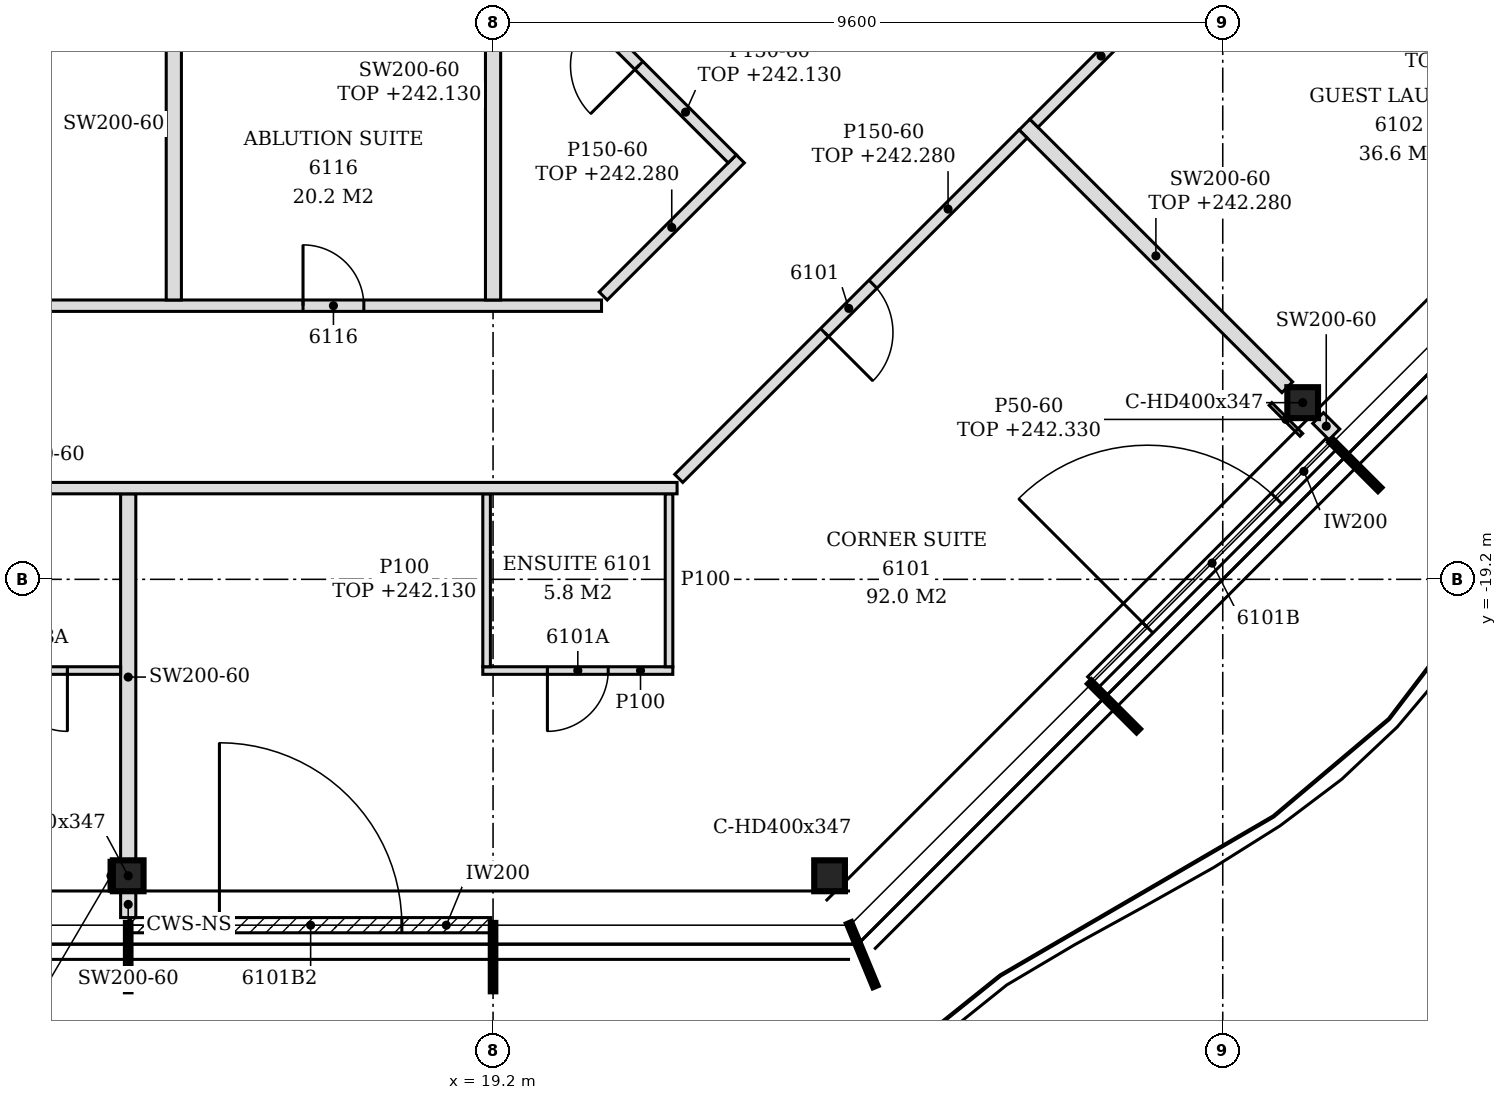
"""IFC4 building model, lengths in metres.
Left out: names, types, materials, properties, quantities, classifications, styles, units other than length and angle.
Written with IfcOpenShell. Run it as: python <this file> out.ifc"""

import sys

from ifc_helpers import new_model, si_unit, direction, frame, frame_2d, origin, origin_2d, place, context, subcontext, project, spatial, polyline, rectangle, i_section, outline, extrude, element, fill, save


model = new_model("IFC4")
c1 = context("Model", 3, precision=1e-05, world=origin(), true_north=direction((0.0, 1.0)))
c2 = subcontext(c1, "Body", "Model", "MODEL_VIEW")
j1 = project(units=[si_unit("LENGTHUNIT", "METRE"), si_unit("PLANEANGLEUNIT", "RADIAN")], contexts=[c1])
p1 = place(None, origin())
s1 = spatial("IfcSite", under=j1, at=p1, CompositionType="ELEMENT")
p2 = place(p1, origin())
s2 = spatial("IfcBuilding", under=s1, at=p2, CompositionType="ELEMENT")
p3 = place(p2, frame((0.0, 0.0, 239.4)))
s3 = spatial("IfcBuildingStorey", under=s2, at=p3, CompositionType="ELEMENT", Elevation=239.4)
for number, where, z_axis, x_axis in (
    (1, (14.4, -23.1, -0.15), (0.0, 0.0, 1.0), (1.0, 0.0, 0.0)),
    (2, (23.627, -23.1, -0.15), (0.0, 0.0, 1.0), (1.0, 0.0, 0.0)),
    (3, (29.852, -16.876, -0.15), (0.0, 0.0, 1.0), (1.0, 0.0, 0.0)),
):
    element("IfcColumn", number, at=place(p3, frame(where, z_axis=z_axis, x_axis=x_axis)), inside=s3, PredefinedType="COLUMN", context=c2, shape_type="SweptSolid", body=[
        extrude(i_section(OverallWidth=0.404, OverallDepth=0.407, WebThickness=0.027, FlangeThickness=0.044, FilletRadius=0.015, at=origin_2d()), origin(), (0.0, 0.0, 1.0), 3.6),
    ])
p4 = place(p3, frame((14.43, -23.75, 0.0), z_axis=(0.0, 0.0, 1.0), x_axis=(1.0, 0.0, 0.0)))
e4 = element("IfcWall", 4, at=p4, inside=s3, PredefinedType="NOTDEFINED", context=c2, shape_type="SweptSolid", body=[
    extrude(rectangle(XDim=4.74, YDim=0.2, at=frame_2d((2.37, 0.0))), origin(), (0.0, 0.0, 1.0), 3.45),
])
p5 = place(p4, frame((1.17, 0.0, 0.0)))
e5 = element("IfcOpeningElement", 5, at=p5, cuts=e4, PredefinedType="OPENING", context=c2, shape_type="SweptSolid", body=[
    extrude(rectangle(XDim=2.4, YDim=2.4, at=frame_2d((1.2, 1.2))), frame((0.0, 0.11, 0.0), z_axis=(0.0, -1.0, 0.0), x_axis=(1.0, 0.0, 0.0)), (0.0, 0.0, 1.0), 0.22),
])
p6 = place(p3, frame((27.093, -20.553, 0.0), z_axis=(0.0, 0.0, 1.0), x_axis=(0.707079231393, 0.707134329907, 0.0)))
e6 = element("IfcWall", 6, at=p6, inside=s3, PredefinedType="NOTDEFINED", context=c2, shape_type="SweptSolid", body=[
    extrude(rectangle(XDim=4.431, YDim=0.2, at=frame_2d((2.215, 0.0))), origin(), (0.0, 0.0, 1.0), 3.45),
])
p7 = place(p6, frame((1.015, 0.0, 0.0)))
e7 = element("IfcOpeningElement", 7, at=p7, cuts=e6, PredefinedType="OPENING", context=c2, shape_type="SweptSolid", body=[
    extrude(rectangle(XDim=2.4, YDim=2.4, at=frame_2d((1.2, 1.2))), frame((0.0, 0.11, 0.0), z_axis=(0.0, -1.0, 0.0), x_axis=(1.0, 0.0, 0.0)), (0.0, 0.0, 1.0), 0.22),
])
p8 = place(p3, frame((14.4, -23.65, 0.0), z_axis=(0.0, 0.0, 1.0), x_axis=(0.0, 1.0, 0.0)))
e8 = element("IfcWall", 8, at=p8, inside=s3, PredefinedType="PARTITIONING", context=c2, shape_type="SweptSolid", body=[
    extrude(rectangle(XDim=0.346, YDim=0.2, at=frame_2d((0.173, 0.0))), origin(), (0.0, 0.0, 1.0), 3.45),
])
p9 = place(p3, frame((14.4, -22.896, 0.0), z_axis=(0.0, 0.0, 1.0), x_axis=(0.0, 1.0, 0.0)))
e9 = element("IfcWall", 9, at=p9, inside=s3, PredefinedType="PARTITIONING", context=c2, shape_type="SweptSolid", body=[
    extrude(outline(polyline([(0.0, 0.0), (4.822, 0.0), (4.822, 3.45), (3.802, 3.45), (3.8, 2.88), (3.592, 2.88), (3.59, 3.45), (0.0, 3.45), (0.0, 0.0)])), frame((0.0, 0.1, 0.0), z_axis=(0.0, -1.0, 0.0), x_axis=(1.0, 0.0, 0.0)), (0.0, 0.0, 1.0), 0.2),
])
p10 = place(p3, frame((11.95, -20.4, 0.0), z_axis=(0.0, 0.0, 1.0), x_axis=(1.0, 0.0, 0.0)))
e10 = element("IfcWall", 10, at=p10, inside=s3, PredefinedType="PARTITIONING", context=c2, shape_type="SweptSolid", body=[
    extrude(rectangle(XDim=2.35, YDim=0.1, at=frame_2d((1.175, 0.0))), origin(), (0.0, 0.0, 1.0), 3.45),
])
p11 = place(p10, frame((0.85, 0.0, 0.0)))
e11 = element("IfcOpeningElement", 11, at=p11, cuts=e10, PredefinedType="OPENING", context=c2, shape_type="SweptSolid", body=[
    extrude(rectangle(XDim=0.8, YDim=2.1, at=frame_2d((0.4, 1.05))), frame((0.0, 0.06, 0.0), z_axis=(0.0, -1.0, 0.0), x_axis=(1.0, 0.0, 0.0)), (0.0, 0.0, 1.0), 0.12),
])
p12 = place(p3, frame((19.065, -20.4, 0.0), z_axis=(0.0, 0.0, 1.0), x_axis=(1.0, 0.0, 0.0)))
e12 = element("IfcWall", 12, at=p12, inside=s3, PredefinedType="PARTITIONING", context=c2, shape_type="SweptSolid", body=[
    extrude(outline(polyline([(0.0, 0.0), (2.5, 0.0), (2.5, 3.45), (0.285, 3.45), (0.283, 2.73), (0.0, 2.73), (0.0, 0.0)])), frame((0.0, 0.05, 0.0), z_axis=(0.0, -1.0, 0.0), x_axis=(1.0, 0.0, 0.0)), (0.0, 0.0, 1.0), 0.1),
])
p13 = place(p12, frame((0.85, 0.0, 0.0)))
e13 = element("IfcOpeningElement", 13, at=p13, cuts=e12, PredefinedType="OPENING", context=c2, shape_type="SweptSolid", body=[
    extrude(rectangle(XDim=0.8, YDim=2.1, at=frame_2d((0.4, 1.05))), frame((0.0, 0.06, 0.0), z_axis=(0.0, -1.0, 0.0), x_axis=(1.0, 0.0, 0.0)), (0.0, 0.0, 1.0), 0.12),
])
p14 = place(p3, frame((19.115, -20.35, 0.0), z_axis=(0.0, 0.0, 1.0), x_axis=(0.0, 1.0, 0.0)))
e14 = element("IfcWall", 14, at=p14, inside=s3, PredefinedType="PARTITIONING", context=c2, shape_type="SweptSolid", body=[
    extrude(rectangle(XDim=2.275, YDim=0.1, at=frame_2d((1.138, 0.0))), origin(), (0.0, 0.0, 1.0), 2.73),
])
p15 = place(p3, frame((21.515, -20.35, 0.0), z_axis=(0.0, 0.0, 1.0), x_axis=(0.0, 1.0, 0.0)))
e15 = element("IfcWall", 15, at=p15, inside=s3, PredefinedType="PARTITIONING", context=c2, shape_type="SweptSolid", body=[
    extrude(outline(polyline([(0.0, 0.0), (2.275, 0.0), (2.275, 3.45), (1.245, 3.45), (1.243, 2.98), (1.055, 2.98), (1.053, 3.45), (0.0, 3.45), (0.0, 0.0)])), frame((0.0, 0.05, 0.0), z_axis=(0.0, -1.0, 0.0), x_axis=(1.0, 0.0, 0.0)), (0.0, 0.0, 1.0), 0.1),
])
p16 = place(p3, frame((-0.726, -18.0, 0.0), z_axis=(0.0, 0.0, 1.0), x_axis=(1.0, 0.0, 0.0)))
e16 = element("IfcWall", 16, at=p16, inside=s3, PredefinedType="PARTITIONING", context=c2, shape_type="SweptSolid", body=[
    extrude(outline(polyline([(0.0, 0.0), (22.347, 0.0), (22.347, 3.45), (20.076, 3.45), (20.074, 2.73), (19.776, 2.73), (19.774, 3.45), (8.076, 3.45), (8.074, 2.73), (7.776, 2.73), (7.774, 3.45), (1.086, 3.45), (1.084, 2.93), (0.512, 2.93), (0.51, 3.45), (0.0, 3.45), (0.0, 0.0)])), frame((0.0, 0.075, 0.0), z_axis=(0.0, -1.0, 0.0), x_axis=(1.0, 0.0, 0.0)), (0.0, 0.0, 1.0), 0.15),
])
p17 = place(p16, frame((5.676, 0.0, 0.0)))
e17 = element("IfcOpeningElement", 17, at=p17, cuts=e16, PredefinedType="OPENING", context=c2, shape_type="SweptSolid", body=[
    extrude(rectangle(XDim=0.9, YDim=2.1, at=frame_2d((0.45, 1.05))), frame((0.0, 0.085, 0.0), z_axis=(0.0, -1.0, 0.0), x_axis=(1.0, 0.0, 0.0)), (0.0, 0.0, 1.0), 0.17),
])
p18 = place(p3, frame((21.643, -17.872, 0.0), z_axis=(0.0, 0.0, 1.0), x_axis=(0.707106781187, 0.707106781187, 0.0)))
e18 = element("IfcWall", 18, at=p18, inside=s3, PredefinedType="PARTITIONING", context=c2, shape_type="SweptSolid", body=[
    extrude(rectangle(XDim=6.408, YDim=0.15, at=frame_2d((3.204, 0.0))), origin(), (0.0, 0.0, 1.0), 2.88),
])
p19 = place(p18, frame((2.713, 0.0, 0.0)))
e19 = element("IfcOpeningElement", 19, at=p19, cuts=e18, PredefinedType="OPENING", context=c2, shape_type="SweptSolid", body=[
    extrude(rectangle(XDim=0.9, YDim=2.1, at=frame_2d((0.45, 1.05))), frame((0.0, 0.085, 0.0), z_axis=(0.0, -1.0, 0.0), x_axis=(1.0, 0.0, 0.0)), (0.0, 0.0, 1.0), 0.17),
])
p20 = place(p3, frame((30.269, -17.293, 0.0), z_axis=(0.0, 0.0, 1.0), x_axis=(-0.707509117806, 0.706704215511, 0.0)))
e20 = element("IfcWall", 20, at=p20, inside=s3, PredefinedType="PARTITIONING", context=c2, shape_type="SweptSolid", body=[
    extrude(rectangle(XDim=0.303, YDim=0.2, at=frame_2d((0.152, 0.0))), origin(), (0.0, 0.0, 1.0), 3.45),
])
p21 = place(p3, frame((29.649, -16.673, 0.0), z_axis=(0.0, 0.0, 1.0), x_axis=(-0.707181695824, 0.707031858612, 0.0)))
e21 = element("IfcWall", 21, at=p21, inside=s3, PredefinedType="PARTITIONING", context=c2, shape_type="SweptSolid", body=[
    extrude(rectangle(XDim=4.888, YDim=0.2, at=frame_2d((2.444, 0.0))), origin(), (0.0, 0.0, 1.0), 2.88),
])
p22 = place(p3, frame((-0.312, -15.6, 0.0), z_axis=(0.0, 0.0, 1.0), x_axis=(1.0, 0.0, 0.0)))
e22 = element("IfcWall", 22, at=p22, inside=s3, PredefinedType="PARTITIONING", context=c2, shape_type="SweptSolid", body=[
    extrude(outline(polyline([(0.0, 0.0), (20.939, 0.0), (20.939, 3.45), (19.662, 3.45), (19.66, 2.73), (19.362, 2.73), (19.36, 3.45), (7.662, 3.45), (7.66, 2.73), (7.362, 2.73), (7.36, 3.45), (0.0, 3.45), (0.0, 0.0)])), frame((0.0, 0.075, 0.0), z_axis=(0.0, -1.0, 0.0), x_axis=(1.0, 0.0, 0.0)), (0.0, 0.0, 1.0), 0.15),
])
p23 = place(p22, frame((17.012, 0.0, 0.0)))
e23 = element("IfcOpeningElement", 23, at=p23, cuts=e22, PredefinedType="OPENING", context=c2, shape_type="SweptSolid", body=[
    extrude(rectangle(XDim=0.8, YDim=2.1, at=frame_2d((0.4, 1.05))), frame((0.0, 0.085, 0.0), z_axis=(0.0, -1.0, 0.0), x_axis=(1.0, 0.0, 0.0)), (0.0, 0.0, 1.0), 0.17),
])
p24 = place(p3, frame((15.0, -15.525, 0.0), z_axis=(0.0, 0.0, 1.0), x_axis=(0.0, 1.0, 0.0)))
e24 = element("IfcWall", 24, at=p24, inside=s3, PredefinedType="PARTITIONING", context=c2, shape_type="SweptSolid", body=[
    extrude(outline(polyline([(0.0, 0.0), (4.625, 0.0), (4.625, 3.45), (1.23, 3.45), (1.228, 2.88), (1.02, 2.88), (1.018, 3.45), (0.0, 3.45), (0.0, 0.0)])), frame((0.0, 0.1, 0.0), z_axis=(0.0, -1.0, 0.0), x_axis=(1.0, 0.0, 0.0)), (0.0, 0.0, 1.0), 0.2),
])
p25 = place(p3, frame((19.2, -15.525, 0.0), z_axis=(0.0, 0.0, 1.0), x_axis=(0.0, 1.0, 0.0)))
e25 = element("IfcWall", 25, at=p25, inside=s3, PredefinedType="PARTITIONING", context=c2, shape_type="SweptSolid", body=[
    extrude(rectangle(XDim=5.12, YDim=0.2, at=frame_2d((2.56, 0.0))), origin(), (0.0, 0.0, 1.0), 2.73),
])
p26 = place(p3, frame((20.649, -15.472, 0.0), z_axis=(0.0, 0.0, 1.0), x_axis=(0.707106781187, 0.707106781187, 0.0)))
e26 = element("IfcWall", 26, at=p26, inside=s3, PredefinedType="PARTITIONING", context=c2, shape_type="SweptSolid", body=[
    extrude(rectangle(XDim=2.551, YDim=0.15, at=frame_2d((1.276, 0.0))), origin(), (0.0, 0.0, 1.0), 2.88),
])
p27 = place(p3, frame((22.347, -13.668, 0.0), z_axis=(0.0, 0.0, 1.0), x_axis=(-0.707106781187, 0.707106781187, 0.0)))
e27 = element("IfcWall", 27, at=p27, inside=s3, PredefinedType="PARTITIONING", context=c2, shape_type="SweptSolid", body=[
    extrude(rectangle(XDim=4.234, YDim=0.15, at=frame_2d((2.117, 0.0))), origin(), (0.0, 0.0, 1.0), 2.73),
])
p28 = place(p27, frame((1.737, 0.0, 0.0)))
e28 = element("IfcOpeningElement", 28, at=p28, cuts=e27, PredefinedType="OPENING", context=c2, shape_type="SweptSolid", body=[
    extrude(rectangle(XDim=0.9, YDim=2.1, at=frame_2d((0.45, 1.05))), frame((0.0, 0.085, 0.0), z_axis=(0.0, -1.0, 0.0), x_axis=(1.0, 0.0, 0.0)), (0.0, 0.0, 1.0), 0.17),
])
p29 = place(p3, frame((26.316, -13.199, 0.0), z_axis=(0.0, 0.0, 1.0), x_axis=(0.707024001185, 0.707189551498, 0.0)))
e29 = element("IfcWall", 29, at=p29, inside=s3, PredefinedType="PARTITIONING", context=c2, shape_type="SweptSolid", body=[
    extrude(rectangle(XDim=5.899, YDim=0.15, at=frame_2d((2.949, 0.0))), origin(), (0.0, 0.0, 1.0), 2.88),
])
p30 = place(p29, frame((2.5, 0.0, 0.0)))
e30 = element("IfcOpeningElement", 30, at=p30, cuts=e29, PredefinedType="OPENING", context=c2, shape_type="SweptSolid", body=[
    extrude(rectangle(XDim=0.9, YDim=2.1, at=frame_2d((0.45, 1.05))), frame((0.0, 0.085, 0.0), z_axis=(0.0, -1.0, 0.0), x_axis=(1.0, 0.0, 0.0)), (0.0, 0.0, 1.0), 0.17),
])
p31 = place(p3, frame((34.581, -12.981, 0.0), z_axis=(0.0, 0.0, 1.0), x_axis=(-0.707133900936, 0.707079660397, 0.0)))
e31 = element("IfcWall", 31, at=p31, inside=s3, PredefinedType="PARTITIONING", context=c2, shape_type="SweptSolid", body=[
    extrude(rectangle(XDim=4.501, YDim=0.2, at=frame_2d((2.25, 0.0))), origin(), (0.0, 0.0, 1.0), 2.63),
])
p32 = place(p3, frame((14.173, -23.303, 0.0), z_axis=(0.0, 0.0, 1.0), x_axis=(0.0, 1.0, 0.0)))
e32 = element("IfcWall", 32, at=p32, inside=s3, PredefinedType="PARTITIONING", context=c2, shape_type="SweptSolid", body=[
    extrude(rectangle(XDim=0.407, YDim=0.05, at=frame_2d((0.204, 0.0))), origin(), (0.0, 0.0, 1.0), 2.93),
])
p33 = place(p3, frame((29.834, -17.299, 0.0), z_axis=(0.0, 0.0, 1.0), x_axis=(-0.707319540847, 0.70689395749, 0.0)))
e33 = element("IfcWall", 33, at=p33, inside=s3, PredefinedType="PARTITIONING", context=c2, shape_type="SweptSolid", body=[
    extrude(rectangle(XDim=0.574, YDim=0.05, at=frame_2d((0.287, 0.0))), origin(), (0.0, 0.0, 1.0), 2.93),
])
p34 = place(p5, origin())
e34 = element("IfcDoor", 34, at=p34, inside=s3, OperationType="SINGLE_SWING_LEFT", PredefinedType="DOOR", context=c2, shape_type="SweptSolid", body=[
    extrude(rectangle(XDim=2.4, YDim=2.4, at=frame_2d((1.2, 1.2))), frame((0.0, 0.025, 0.0), z_axis=(0.0, -1.0, 0.0), x_axis=(1.0, 0.0, 0.0)), (0.0, 0.0, 1.0), 0.05),
])
fill(e5, e34)
p35 = place(p7, origin())
e35 = element("IfcDoor", 35, at=p35, inside=s3, OperationType="SINGLE_SWING_LEFT", PredefinedType="DOOR", context=c2, shape_type="SweptSolid", body=[
    extrude(rectangle(XDim=2.4, YDim=2.4, at=frame_2d((1.2, 1.2))), frame((0.0, 0.025, 0.0), z_axis=(0.0, -1.0, 0.0), x_axis=(1.0, 0.0, 0.0)), (0.0, 0.0, 1.0), 0.05),
])
fill(e7, e35)
p36 = place(p19, frame((0.9, 0.0, 0.0), z_axis=(0.0, 0.0, 1.0), x_axis=(-1.0, 0.0, 0.0)))
e36 = element("IfcDoor", 36, at=p36, inside=s3, OperationType="SINGLE_SWING_RIGHT", PredefinedType="DOOR", context=c2, shape_type="SweptSolid", body=[
    extrude(rectangle(XDim=0.9, YDim=2.1, at=frame_2d((0.45, 1.05))), frame((0.0, 0.025, 0.0), z_axis=(0.0, -1.0, 0.0), x_axis=(1.0, 0.0, 0.0)), (0.0, 0.0, 1.0), 0.05),
])
fill(e19, e36)
p37 = place(p13, frame((0.8, 0.0, 0.0), z_axis=(0.0, 0.0, 1.0), x_axis=(-1.0, 0.0, 0.0)))
e37 = element("IfcDoor", 37, at=p37, inside=s3, OperationType="SINGLE_SWING_RIGHT", PredefinedType="DOOR", context=c2, shape_type="SweptSolid", body=[
    extrude(rectangle(XDim=0.8, YDim=2.1, at=frame_2d((0.4, 1.05))), frame((0.0, 0.025, 0.0), z_axis=(0.0, -1.0, 0.0), x_axis=(1.0, 0.0, 0.0)), (0.0, 0.0, 1.0), 0.05),
])
fill(e13, e37)
p38 = place(p11, frame((0.8, 0.0, 0.0), z_axis=(0.0, 0.0, 1.0), x_axis=(-1.0, 0.0, 0.0)))
e38 = element("IfcDoor", 38, at=p38, inside=s3, OperationType="SINGLE_SWING_LEFT", PredefinedType="DOOR", context=c2, shape_type="SweptSolid", body=[
    extrude(rectangle(XDim=0.8, YDim=2.1, at=frame_2d((0.4, 1.05))), frame((0.0, 0.025, 0.0), z_axis=(0.0, -1.0, 0.0), x_axis=(1.0, 0.0, 0.0)), (0.0, 0.0, 1.0), 0.05),
])
fill(e11, e38)
p39 = place(p23, origin())
e39 = element("IfcDoor", 39, at=p39, inside=s3, OperationType="SINGLE_SWING_LEFT", PredefinedType="DOOR", context=c2, shape_type="SweptSolid", body=[
    extrude(rectangle(XDim=0.8, YDim=2.1, at=frame_2d((0.4, 1.05))), frame((0.0, 0.025, 0.0), z_axis=(0.0, -1.0, 0.0), x_axis=(1.0, 0.0, 0.0)), (0.0, 0.0, 1.0), 0.05),
])
fill(e23, e39)
p40 = place(p28, origin())
e40 = element("IfcDoor", 40, at=p40, inside=s3, OperationType="SINGLE_SWING_LEFT", PredefinedType="DOOR", context=c2, shape_type="SweptSolid", body=[
    extrude(rectangle(XDim=0.9, YDim=2.1, at=frame_2d((0.45, 1.05))), frame((0.0, 0.025, 0.0), z_axis=(0.0, -1.0, 0.0), x_axis=(1.0, 0.0, 0.0)), (0.0, 0.0, 1.0), 0.05),
])
fill(e28, e40)
save(model, sys.argv[1])
